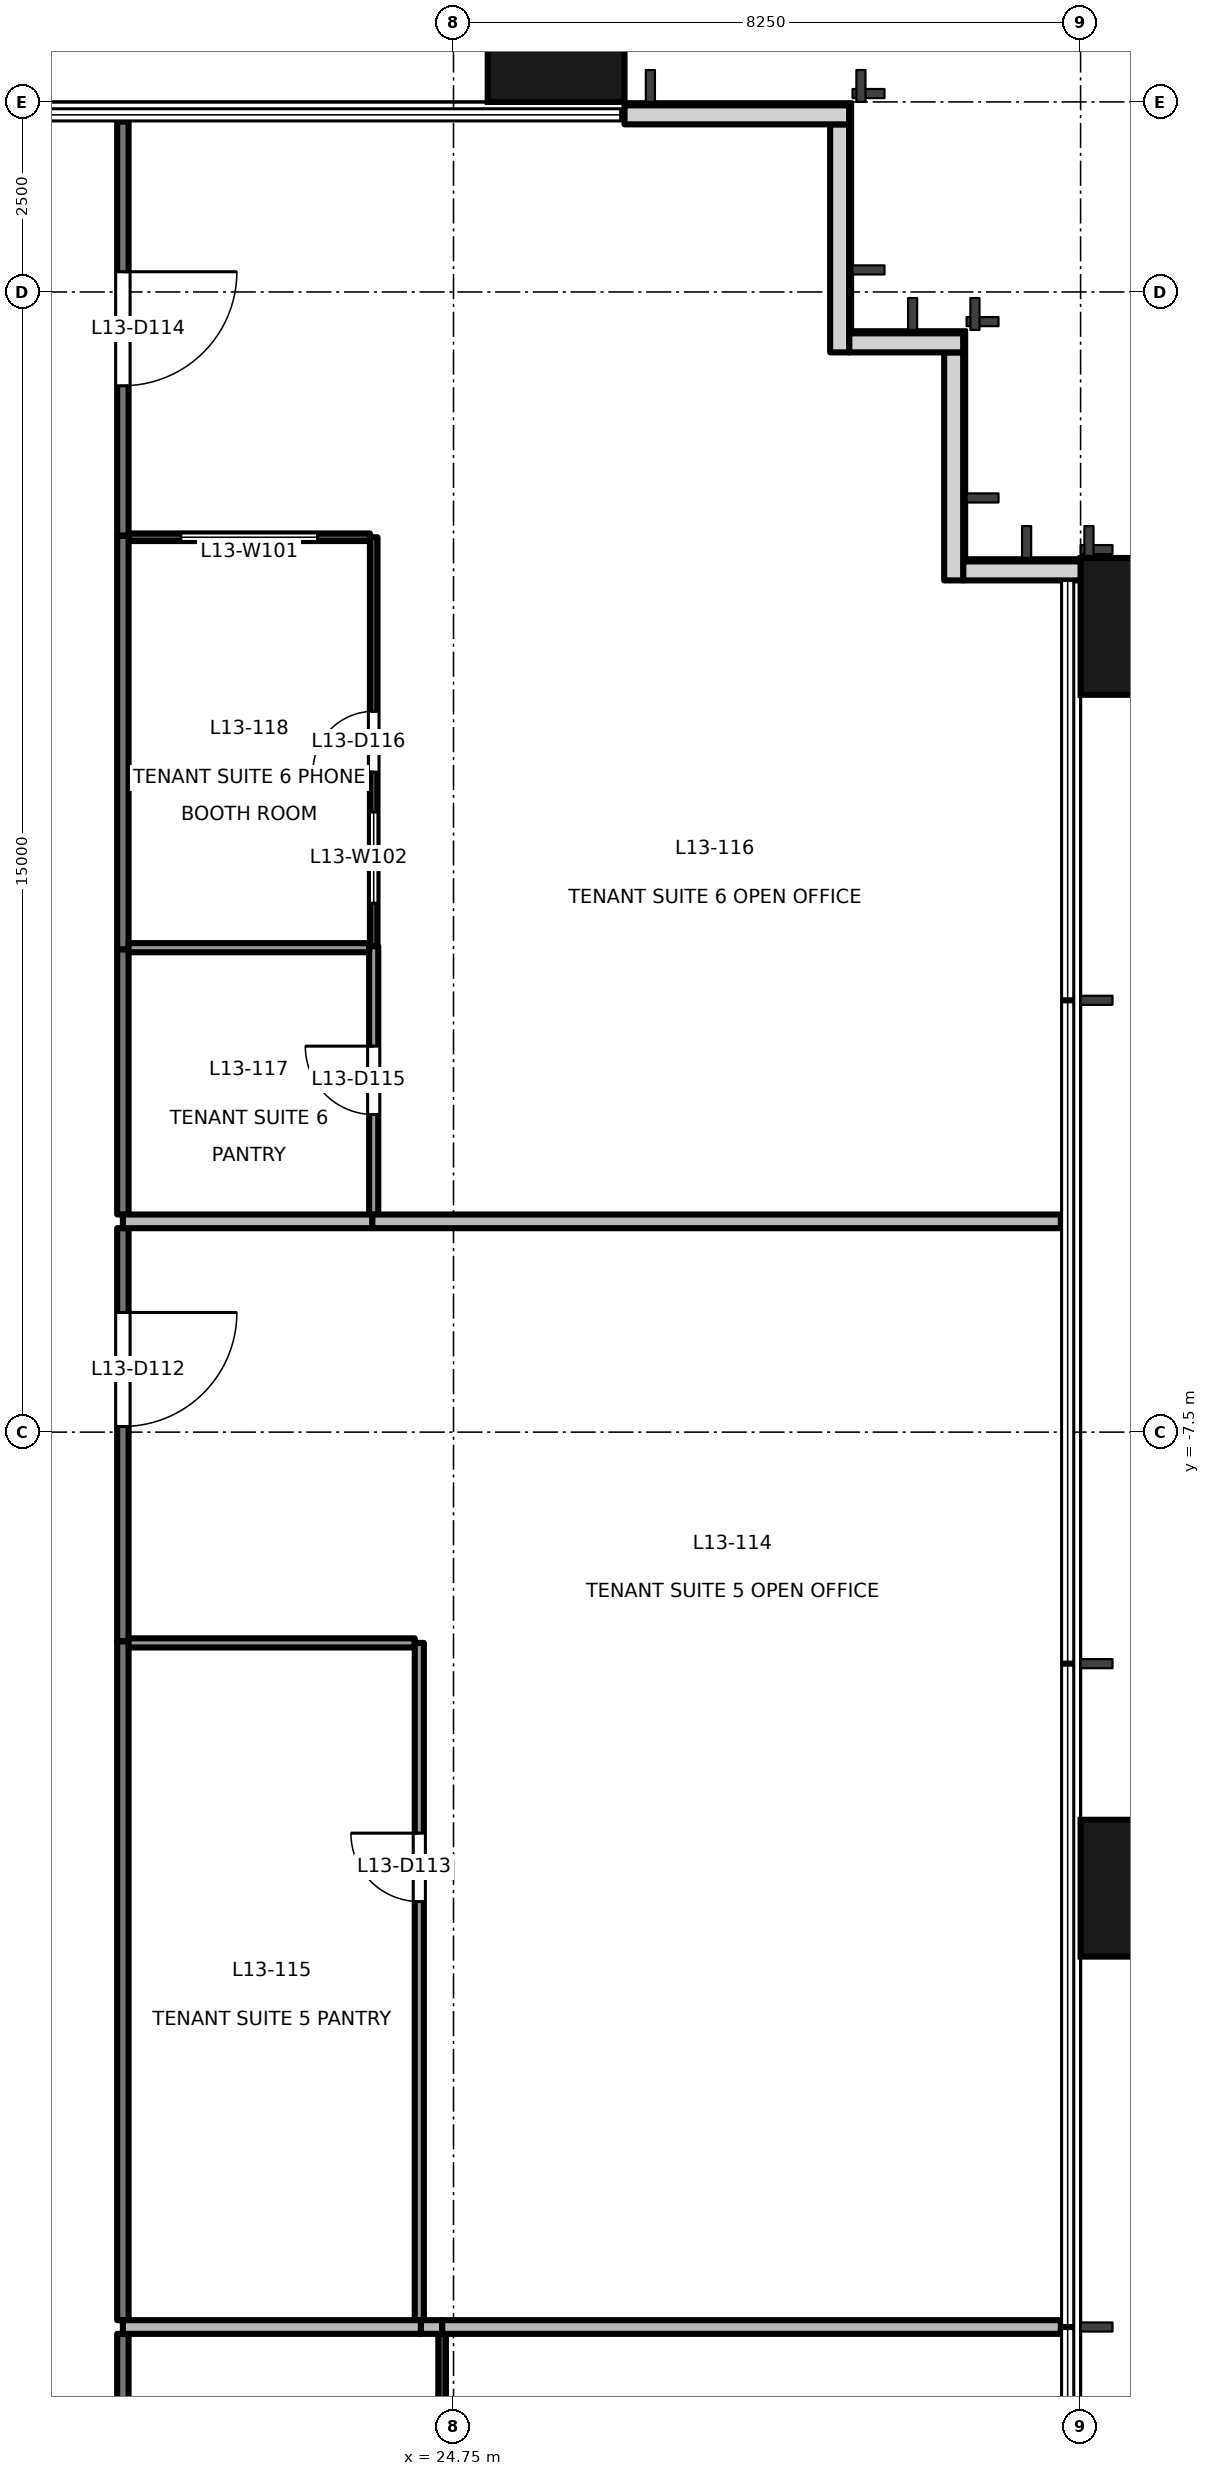
"""IFC4 building model, lengths in metres.
Left out: names, types, materials, properties, quantities, classifications, styles, units other than length and angle.
Written with IfcOpenShell. Run it as: python <this file> out.ifc"""

import sys

from ifc_helpers import new_model, si_unit, direction, frame, frame_2d, origin, origin_2d, place, context, subcontext, project, spatial, rectangle, extrude, element, fill, save


model = new_model("IFC4")
c1 = context("Model", 3, precision=1e-05, world=origin(), true_north=direction((0.0, 1.0)))
c2 = subcontext(c1, "Body", "Model", "MODEL_VIEW")
j1 = project(units=[si_unit("LENGTHUNIT", "METRE"), si_unit("PLANEANGLEUNIT", "RADIAN")], contexts=[c1])
p1 = place(None, origin())
s1 = spatial("IfcSite", under=j1, at=p1, CompositionType="ELEMENT")
p2 = place(p1, origin())
s2 = spatial("IfcBuilding", under=s1, at=p2, CompositionType="ELEMENT")
p3 = place(p2, frame((0.0, 0.0, 61.1)))
s3 = spatial("IfcBuildingStorey", under=s2, at=p3, CompositionType="ELEMENT", Elevation=61.1)
for number, where, z_axis, x_axis in (
    (1, (33.9, -13.5, -0.2), (0.0, 0.0, 1.0), (0.0, 1.0, 0.0)),
    (2, (33.9, 3.1, -0.2), (0.0, 0.0, 1.0), (0.0, 1.0, 0.0)),
    (3, (26.1, 10.9, -0.2), (0.0, 0.0, 1.0), (1.0, 0.0, 0.0)),
):
    element("IfcColumn", number, at=place(p3, frame(where, z_axis=z_axis, x_axis=x_axis)), inside=s3, PredefinedType="COLUMN", context=c2, shape_type="SweptSolid", body=[
        extrude(rectangle(XDim=1.8, YDim=1.8, at=origin_2d()), origin(), (0.0, 0.0, 1.0), 4.1),
    ])
p4 = place(p3, frame((33.005, 3.83, 0.0), z_axis=(0.0, 0.0, 1.0), x_axis=(-1.0, 0.0, 0.0)))
e4 = element("IfcWall", 4, at=p4, inside=s3, PredefinedType="SOLIDWALL", context=c2, shape_type="SweptSolid", body=[
    extrude(rectangle(XDim=1.55, YDim=0.25, at=frame_2d((0.775, 0.0))), origin(), (0.0, 0.0, 1.0), 3.9),
])
p5 = place(p3, frame((31.33, 3.705, 0.0), z_axis=(0.0, 0.0, 1.0), x_axis=(0.0, 1.0, 0.0)))
e5 = element("IfcWall", 5, at=p5, inside=s3, PredefinedType="SOLIDWALL", context=c2, shape_type="SweptSolid", body=[
    extrude(rectangle(XDim=3.0, YDim=0.25, at=frame_2d((1.5, 0.0))), origin(), (0.0, 0.0, 1.0), 3.9),
])
p6 = place(p3, frame((31.455, 6.83, 0.0), z_axis=(0.0, 0.0, 1.0), x_axis=(-1.0, 0.0, 0.0)))
e6 = element("IfcWall", 6, at=p6, inside=s3, PredefinedType="SOLIDWALL", context=c2, shape_type="SweptSolid", body=[
    extrude(rectangle(XDim=1.5, YDim=0.25, at=frame_2d((0.75, 0.0))), origin(), (0.0, 0.0, 1.0), 3.9),
])
p7 = place(p3, frame((29.83, 6.705, 0.0), z_axis=(0.0, 0.0, 1.0), x_axis=(0.0, 1.0, 0.0)))
e7 = element("IfcWall", 7, at=p7, inside=s3, PredefinedType="SOLIDWALL", context=c2, shape_type="SweptSolid", body=[
    extrude(rectangle(XDim=3.0, YDim=0.25, at=frame_2d((1.5, 0.0))), origin(), (0.0, 0.0, 1.0), 3.9),
])
p8 = place(p3, frame((29.955, 9.83, 0.0), z_axis=(0.0, 0.0, 1.0), x_axis=(-1.0, 0.0, 0.0)))
e8 = element("IfcWall", 8, at=p8, inside=s3, PredefinedType="SOLIDWALL", context=c2, shape_type="SweptSolid", body=[
    extrude(rectangle(XDim=2.955, YDim=0.25, at=frame_2d((1.478, 0.0))), origin(), (0.0, 0.0, 1.0), 3.9),
])
p9 = place(p3, frame((20.4, -19.363, 0.0), z_axis=(0.0, 0.0, 1.0), x_axis=(0.0, -1.0, 0.0)))
e9 = element("IfcWall", 9, at=p9, inside=s3, PredefinedType="PARTITIONING", context=c2, shape_type="SweptSolid", body=[
    extrude(rectangle(XDim=4.417, YDim=0.15, at=frame_2d((2.208, 0.0))), origin(), (0.0, 0.0, 1.0), 3.3),
])
p10 = place(p3, frame((20.4, -4.817, 0.0), z_axis=(0.0, 0.0, 1.0), x_axis=(0.0, -1.0, 0.0)))
e10 = element("IfcWall", 10, at=p10, inside=s3, PredefinedType="PARTITIONING", context=c2, shape_type="SweptSolid", body=[
    extrude(rectangle(XDim=5.436, YDim=0.15, at=frame_2d((2.718, 0.0))), origin(), (0.0, 0.0, 1.0), 3.3),
])
p11 = place(p10, frame((1.109, 0.0, 0.0)))
e11 = element("IfcOpeningElement", 11, at=p11, cuts=e10, PredefinedType="OPENING", context=c2, shape_type="SweptSolid", body=[
    extrude(rectangle(XDim=1.5, YDim=2.1, at=frame_2d((0.75, 1.05))), frame((0.0, 0.085, 0.0), z_axis=(0.0, -1.0, 0.0), x_axis=(1.0, 0.0, 0.0)), (0.0, 0.0, 1.0), 0.171),
])
p12 = place(p3, frame((20.4, -10.253, 0.0), z_axis=(0.0, 0.0, 1.0), x_axis=(0.0, -1.0, 0.0)))
e12 = element("IfcWall", 12, at=p12, inside=s3, PredefinedType="PARTITIONING", context=c2, shape_type="SweptSolid", body=[
    extrude(rectangle(XDim=8.93, YDim=0.15, at=frame_2d((4.465, 0.0))), origin(), (0.0, 0.0, 1.0), 3.3),
])
p13 = place(p3, frame((20.4, 9.74, 0.0), z_axis=(0.0, 0.0, 1.0), x_axis=(0.0, -1.0, 0.0)))
e13 = element("IfcWall", 13, at=p13, inside=s3, PredefinedType="PARTITIONING", context=c2, shape_type="SweptSolid", body=[
    extrude(rectangle(XDim=5.447, YDim=0.15, at=frame_2d((2.724, 0.0))), origin(), (0.0, 0.0, 1.0), 3.9),
])
p14 = place(p13, frame((1.974, 0.0, 0.0)))
e14 = element("IfcOpeningElement", 14, at=p14, cuts=e13, PredefinedType="OPENING", context=c2, shape_type="SweptSolid", body=[
    extrude(rectangle(XDim=1.5, YDim=2.1, at=frame_2d((0.75, 1.05))), frame((0.0, 0.085, 0.0), z_axis=(0.0, -1.0, 0.0), x_axis=(1.0, 0.0, 0.0)), (0.0, 0.0, 1.0), 0.171),
])
p15 = place(p3, frame((20.4, -1.147, 0.0), z_axis=(0.0, 0.0, 1.0), x_axis=(0.0, -1.0, 0.0)))
e15 = element("IfcWall", 15, at=p15, inside=s3, PredefinedType="PARTITIONING", context=c2, shape_type="SweptSolid", body=[
    extrude(rectangle(XDim=3.49, YDim=0.15, at=frame_2d((1.745, 0.0))), origin(), (0.0, 0.0, 1.0), 3.3),
])
p16 = place(p3, frame((20.4, 4.293, 0.0), z_axis=(0.0, 0.0, 1.0), x_axis=(0.0, -1.0, 0.0)))
e16 = element("IfcWall", 16, at=p16, inside=s3, PredefinedType="PARTITIONING", context=c2, shape_type="SweptSolid", body=[
    extrude(rectangle(XDim=5.44, YDim=0.15, at=frame_2d((2.72, 0.0))), origin(), (0.0, 0.0, 1.0), 3.3),
])
p17 = place(p3, frame((24.6, -23.76, 0.0), z_axis=(0.0, 0.0, 1.0), x_axis=(0.0, 1.0, 0.0)))
e17 = element("IfcWall", 17, at=p17, inside=s3, PredefinedType="PARTITIONING", context=c2, shape_type="SweptSolid", body=[
    extrude(rectangle(XDim=4.397, YDim=0.1, at=frame_2d((2.198, 0.0))), origin(), (0.0, 0.0, 1.0), 3.3),
])
p18 = place(p17, frame((1.179, 0.0, 0.0)))
e18 = element("IfcOpeningElement", 18, at=p18, cuts=e17, PredefinedType="OPENING", context=c2, shape_type="SweptSolid", body=[
    extrude(rectangle(XDim=0.8, YDim=2.1, at=frame_2d((0.4, 1.05))), frame((0.0, 0.061, 0.0), z_axis=(0.0, -1.0, 0.0), x_axis=(1.0, 0.0, 0.0)), (0.0, 0.0, 1.0), 0.121),
])
p19 = place(p3, frame((24.6, -19.273, 0.0), z_axis=(0.0, 0.0, 1.0), x_axis=(1.0, 0.0, 0.0)))
e19 = element("IfcWall", 19, at=p19, inside=s3, PredefinedType="PARTITIONING", context=c2, shape_type="SweptSolid", body=[
    extrude(rectangle(XDim=8.14, YDim=0.18, at=frame_2d((4.07, 0.0))), origin(), (0.0, 0.0, 1.0), 3.9),
])
p20 = place(p3, frame((24.32, -19.273, 0.0), z_axis=(0.0, 0.0, 1.0), x_axis=(1.0, 0.0, 0.0)))
e20 = element("IfcWall", 20, at=p20, inside=s3, PredefinedType="PARTITIONING", context=c2, shape_type="SweptSolid", body=[
    extrude(rectangle(XDim=0.28, YDim=0.18, at=frame_2d((0.14, 0.0))), origin(), (0.0, 0.0, 1.0), 3.9),
])
p21 = place(p3, frame((20.4, -19.273, 0.0), z_axis=(0.0, 0.0, 1.0), x_axis=(1.0, 0.0, 0.0)))
e21 = element("IfcWall", 21, at=p21, inside=s3, PredefinedType="PARTITIONING", context=c2, shape_type="SweptSolid", body=[
    extrude(rectangle(XDim=3.92, YDim=0.18, at=frame_2d((1.96, 0.0))), origin(), (0.0, 0.0, 1.0), 3.9),
])
p22 = place(p3, frame((24.24, -10.273, 0.0), z_axis=(0.0, 0.0, 1.0), x_axis=(-1.0, 0.0, 0.0)))
e22 = element("IfcWall", 22, at=p22, inside=s3, PredefinedType="PARTITIONING", context=c2, shape_type="SweptSolid", body=[
    extrude(rectangle(XDim=3.765, YDim=0.12, at=frame_2d((1.882, 0.0))), origin(), (0.0, 0.0, 1.0), 3.9),
])
p23 = place(p3, frame((24.3, -19.183, 0.0), z_axis=(0.0, 0.0, 1.0), x_axis=(0.0, 1.0, 0.0)))
e23 = element("IfcWall", 23, at=p23, inside=s3, PredefinedType="PARTITIONING", context=c2, shape_type="SweptSolid", body=[
    extrude(rectangle(XDim=8.91, YDim=0.12, at=frame_2d((4.455, 0.0))), origin(), (0.0, 0.0, 1.0), 3.3),
])
p24 = place(p23, frame((5.507, 0.0, 0.0)))
e24 = element("IfcOpeningElement", 24, at=p24, cuts=e23, PredefinedType="OPENING", context=c2, shape_type="SweptSolid", body=[
    extrude(rectangle(XDim=0.9, YDim=2.1, at=frame_2d((0.45, 1.05))), frame((0.0, 0.071, 0.0), z_axis=(0.0, -1.0, 0.0), x_axis=(1.0, 0.0, 0.0)), (0.0, 0.0, 1.0), 0.141),
])
p25 = place(p3, frame((23.68, -4.727, 0.0), z_axis=(0.0, 0.0, 1.0), x_axis=(1.0, 0.0, 0.0)))
e25 = element("IfcWall", 25, at=p25, inside=s3, PredefinedType="PARTITIONING", context=c2, shape_type="SweptSolid", body=[
    extrude(rectangle(XDim=9.06, YDim=0.18, at=frame_2d((4.53, 0.0))), origin(), (0.0, 0.0, 1.0), 3.3),
])
p26 = place(p3, frame((20.4, -4.727, 0.0), z_axis=(0.0, 0.0, 1.0), x_axis=(1.0, 0.0, 0.0)))
e26 = element("IfcWall", 26, at=p26, inside=s3, PredefinedType="PARTITIONING", context=c2, shape_type="SweptSolid", body=[
    extrude(rectangle(XDim=3.28, YDim=0.18, at=frame_2d((1.64, 0.0))), origin(), (0.0, 0.0, 1.0), 3.3),
])
p27 = place(p3, frame((23.7, -4.637, 0.0), z_axis=(0.0, 0.0, 1.0), x_axis=(0.0, 1.0, 0.0)))
e27 = element("IfcWall", 27, at=p27, inside=s3, PredefinedType="PARTITIONING", context=c2, shape_type="SweptSolid", body=[
    extrude(rectangle(XDim=3.53, YDim=0.12, at=frame_2d((1.765, 0.0))), origin(), (0.0, 0.0, 1.0), 3.3),
])
p28 = place(p27, frame((1.315, 0.0, 0.0)))
e28 = element("IfcOpeningElement", 28, at=p28, cuts=e27, PredefinedType="OPENING", context=c2, shape_type="SweptSolid", body=[
    extrude(rectangle(XDim=0.9, YDim=2.1, at=frame_2d((0.45, 1.05))), frame((0.0, 0.071, 0.0), z_axis=(0.0, -1.0, 0.0), x_axis=(1.0, 0.0, 0.0)), (0.0, 0.0, 1.0), 0.141),
])
p29 = place(p3, frame((23.65, 4.273, 0.0), z_axis=(0.0, 0.0, 1.0), x_axis=(-1.0, 0.0, 0.0)))
e29 = element("IfcWall", 29, at=p29, inside=s3, PredefinedType="PARTITIONING", context=c2, shape_type="SweptSolid", body=[
    extrude(rectangle(XDim=3.175, YDim=0.1, at=frame_2d((1.587, 0.0))), origin(), (0.0, 0.0, 1.0), 3.9),
])
p30 = place(p29, frame((0.688, 0.0, 0.9)))
e30 = element("IfcOpeningElement", 30, at=p30, cuts=e29, PredefinedType="OPENING", context=c2, shape_type="SweptSolid", body=[
    extrude(rectangle(XDim=1.8, YDim=1.2, at=frame_2d((0.9, 0.6))), frame((0.0, 0.061, 0.0), z_axis=(0.0, -1.0, 0.0), x_axis=(1.0, 0.0, 0.0)), (0.0, 0.0, 1.0), 0.121),
])
p31 = place(p3, frame((23.7, -1.107, 0.0), z_axis=(0.0, 0.0, 1.0), x_axis=(0.0, 1.0, 0.0)))
e31 = element("IfcWall", 31, at=p31, inside=s3, PredefinedType="PARTITIONING", context=c2, shape_type="SweptSolid", body=[
    extrude(rectangle(XDim=5.38, YDim=0.1, at=frame_2d((2.69, 0.0))), origin(), (0.0, 0.0, 1.0), 3.3),
])
p32 = place(p31, frame((2.29, 0.0, 0.0)))
e32 = element("IfcOpeningElement", 32, at=p32, cuts=e31, PredefinedType="OPENING", context=c2, shape_type="SweptSolid", body=[
    extrude(rectangle(XDim=0.8, YDim=2.1, at=frame_2d((0.4, 1.05))), frame((0.0, 0.061, 0.0), z_axis=(0.0, -1.0, 0.0), x_axis=(1.0, 0.0, 0.0)), (0.0, 0.0, 1.0), 0.121),
])
p33 = place(p31, frame((0.565, 0.0, 0.9)))
e33 = element("IfcOpeningElement", 33, at=p33, cuts=e31, PredefinedType="OPENING", context=c2, shape_type="SweptSolid", body=[
    extrude(rectangle(XDim=1.2, YDim=1.2, at=frame_2d((0.6, 0.6))), frame((0.0, 0.061, 0.0), z_axis=(0.0, -1.0, 0.0), x_axis=(1.0, 0.0, 0.0)), (0.0, 0.0, 1.0), 0.121),
])
p34 = place(p3, frame((20.475, -1.127, 0.0), z_axis=(0.0, 0.0, 1.0), x_axis=(1.0, 0.0, 0.0)))
e34 = element("IfcWall", 34, at=p34, inside=s3, PredefinedType="PARTITIONING", context=c2, shape_type="SweptSolid", body=[
    extrude(rectangle(XDim=3.165, YDim=0.12, at=frame_2d((1.583, 0.0))), origin(), (0.0, 0.0, 1.0), 3.9),
])
p35 = place(p11, origin())
e35 = element("IfcDoor", 35, at=p35, inside=s3, OperationType="DOUBLE_DOOR_SINGLE_SWING", PredefinedType="DOOR", context=c2, shape_type="SweptSolid", body=[
    extrude(rectangle(XDim=1.5, YDim=2.1, at=frame_2d((0.75, 1.05))), frame((0.0, 0.025, 0.0), z_axis=(0.0, -1.0, 0.0), x_axis=(1.0, 0.0, 0.0)), (0.0, 0.0, 1.0), 0.05),
])
fill(e11, e35)
p36 = place(p24, origin())
e36 = element("IfcDoor", 36, at=p36, inside=s3, OperationType="SINGLE_SWING_RIGHT", PredefinedType="DOOR", context=c2, shape_type="SweptSolid", body=[
    extrude(rectangle(XDim=0.9, YDim=2.1, at=frame_2d((0.45, 1.05))), frame((0.0, 0.025, 0.0), z_axis=(0.0, -1.0, 0.0), x_axis=(1.0, 0.0, 0.0)), (0.0, 0.0, 1.0), 0.05),
])
fill(e24, e36)
p37 = place(p14, origin())
e37 = element("IfcDoor", 37, at=p37, inside=s3, OperationType="DOUBLE_DOOR_SINGLE_SWING", PredefinedType="DOOR", context=c2, shape_type="SweptSolid", body=[
    extrude(rectangle(XDim=1.5, YDim=2.1, at=frame_2d((0.75, 1.05))), frame((0.0, 0.025, 0.0), z_axis=(0.0, -1.0, 0.0), x_axis=(1.0, 0.0, 0.0)), (0.0, 0.0, 1.0), 0.05),
])
fill(e14, e37)
p38 = place(p28, origin())
e38 = element("IfcDoor", 38, at=p38, inside=s3, OperationType="SINGLE_SWING_RIGHT", PredefinedType="DOOR", context=c2, shape_type="SweptSolid", body=[
    extrude(rectangle(XDim=0.9, YDim=2.1, at=frame_2d((0.45, 1.05))), frame((0.0, 0.025, 0.0), z_axis=(0.0, -1.0, 0.0), x_axis=(1.0, 0.0, 0.0)), (0.0, 0.0, 1.0), 0.05),
])
fill(e28, e38)
p39 = place(p32, origin())
e39 = element("IfcDoor", 39, at=p39, inside=s3, OperationType="SINGLE_SWING_LEFT", PredefinedType="DOOR", context=c2, shape_type="SweptSolid", body=[
    extrude(rectangle(XDim=0.8, YDim=2.1, at=frame_2d((0.4, 1.05))), frame((0.0, 0.025, 0.0), z_axis=(0.0, -1.0, 0.0), x_axis=(1.0, 0.0, 0.0)), (0.0, 0.0, 1.0), 0.05),
])
fill(e32, e39)
p40 = place(p30, origin())
e40 = element("IfcWindow", 40, at=p40, inside=s3, PartitioningType="SINGLE_PANEL", PredefinedType="WINDOW", context=c2, shape_type="SweptSolid", body=[
    extrude(rectangle(XDim=1.8, YDim=1.2, at=frame_2d((0.9, 0.6))), frame((0.0, 0.03, 0.0), z_axis=(0.0, -1.0, 0.0), x_axis=(1.0, 0.0, 0.0)), (0.0, 0.0, 1.0), 0.06),
])
fill(e30, e40)
p41 = place(p33, origin())
e41 = element("IfcWindow", 41, at=p41, inside=s3, PartitioningType="SINGLE_PANEL", PredefinedType="WINDOW", context=c2, shape_type="SweptSolid", body=[
    extrude(rectangle(XDim=1.2, YDim=1.2, at=frame_2d((0.6, 0.6))), frame((0.0, 0.03, 0.0), z_axis=(0.0, -1.0, 0.0), x_axis=(1.0, 0.0, 0.0)), (0.0, 0.0, 1.0), 0.06),
])
fill(e33, e41)
save(model, sys.argv[1])
